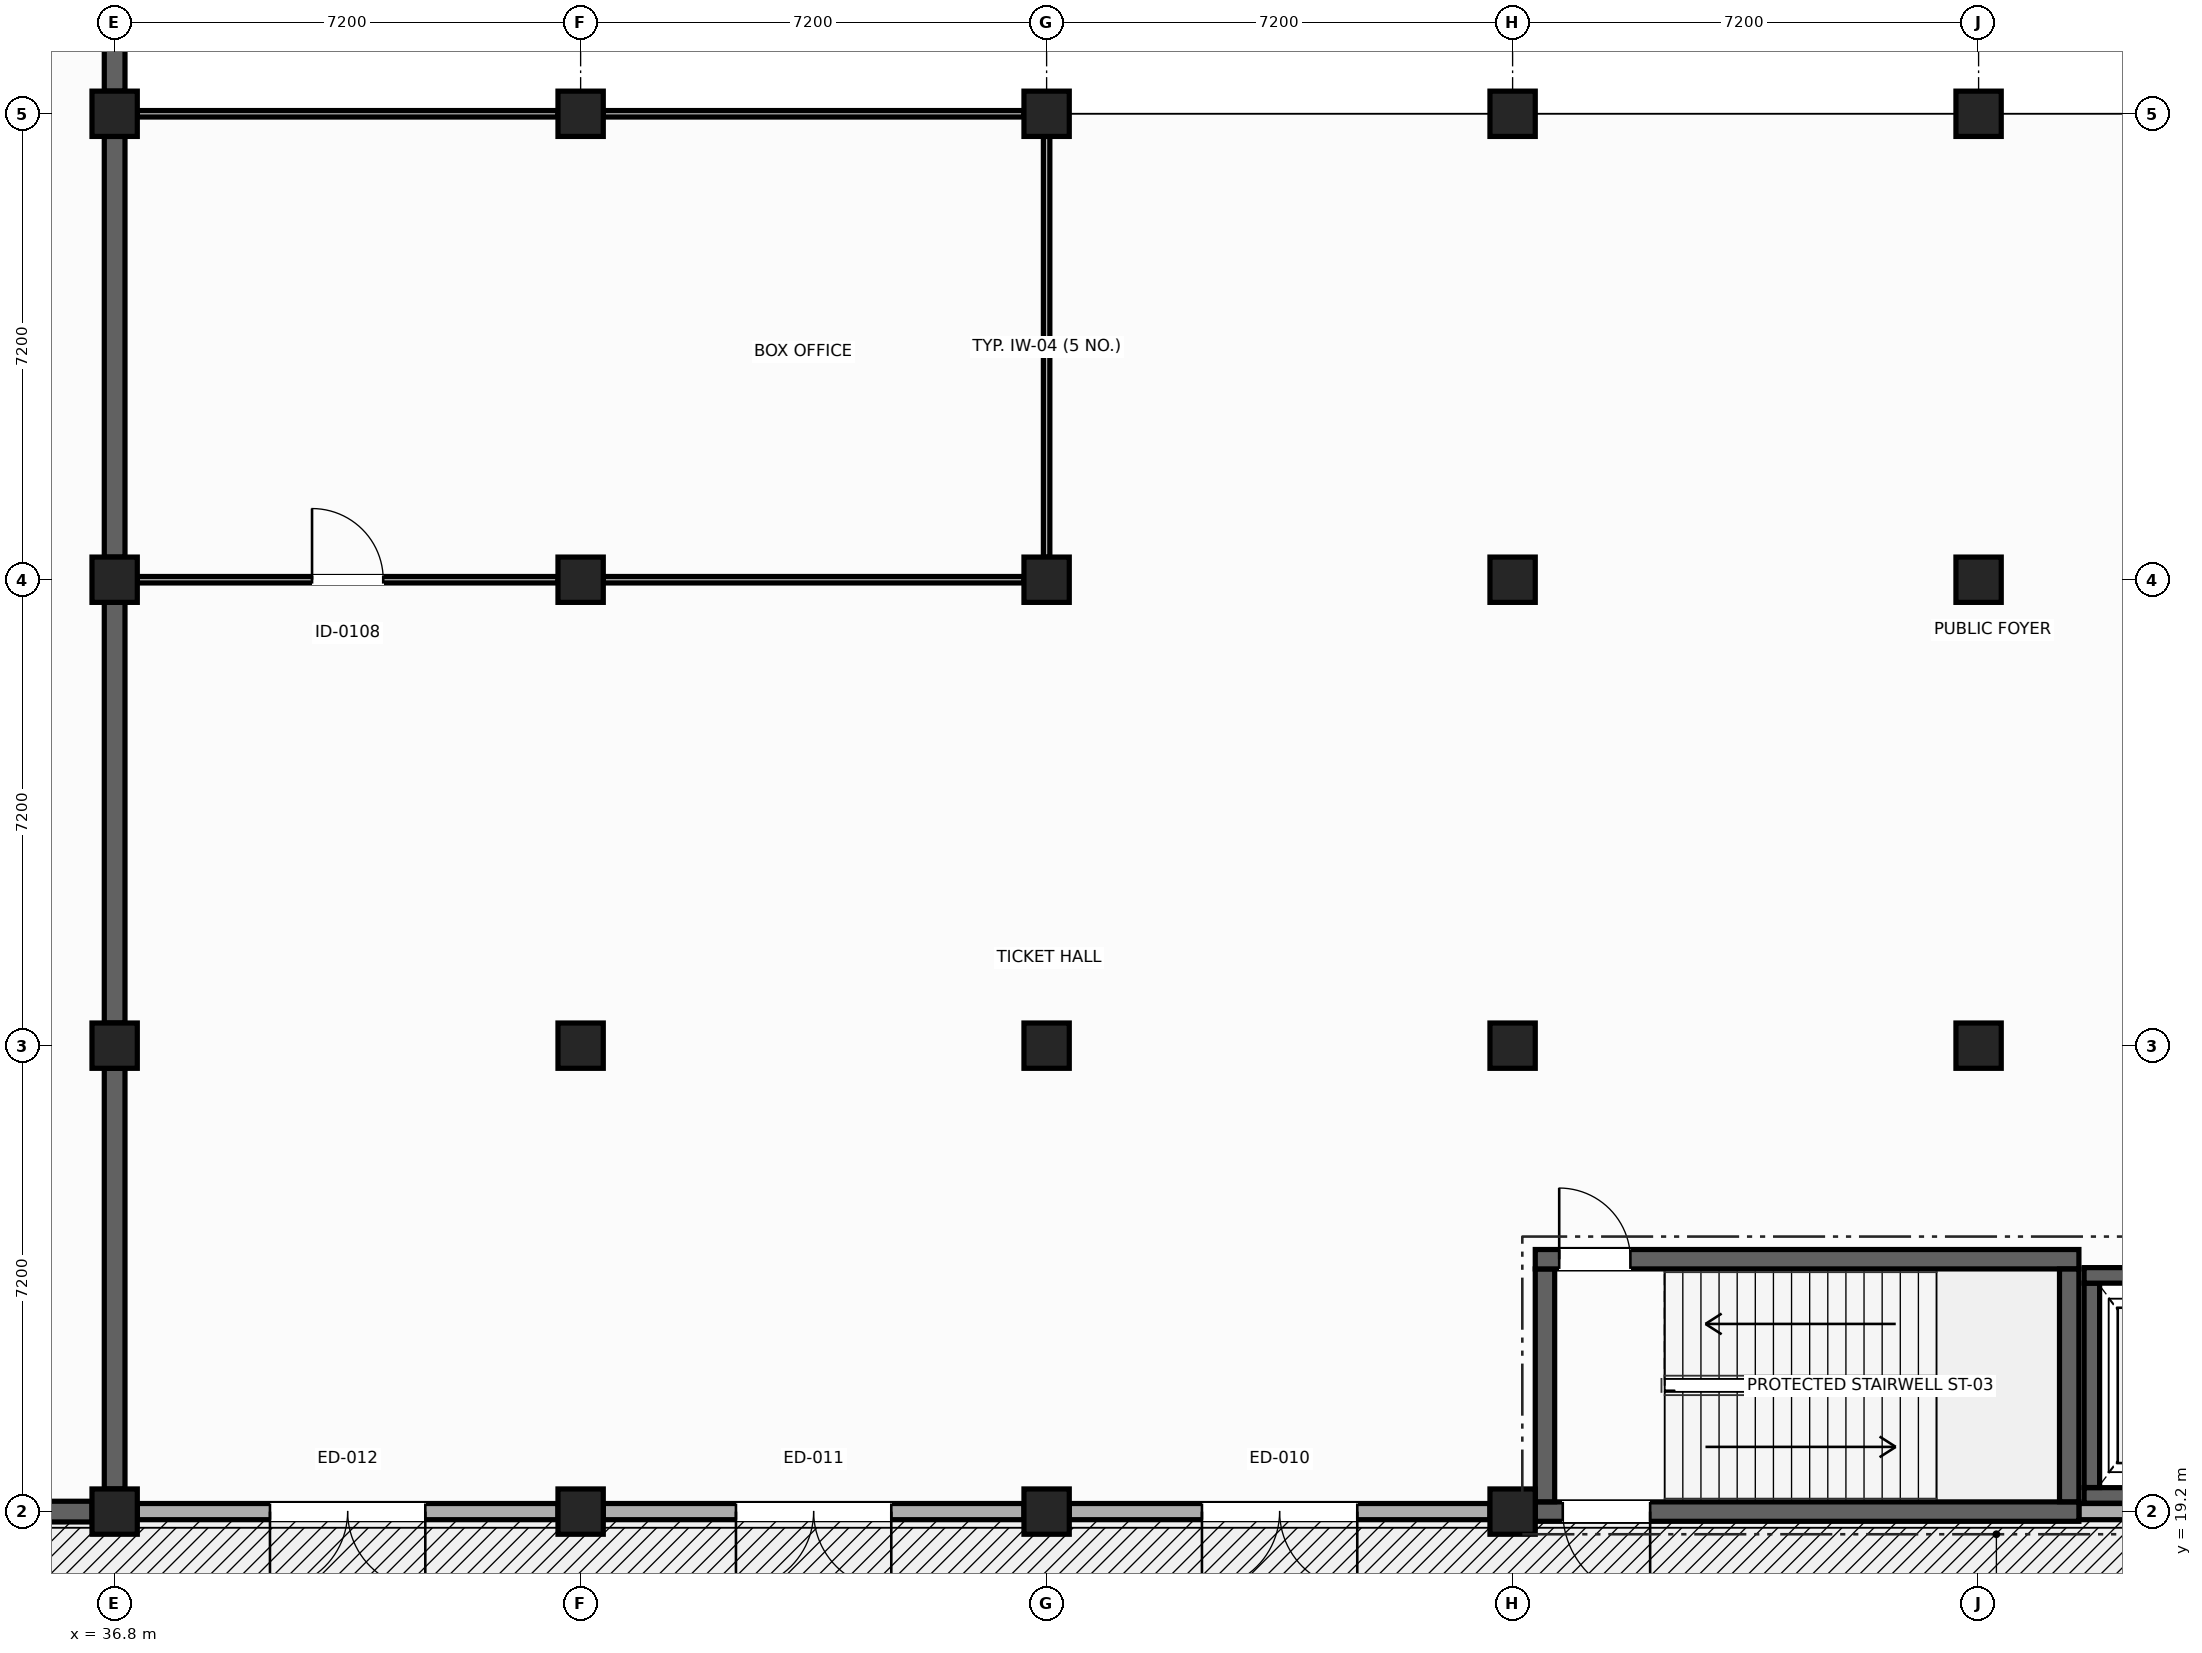
"""IFC4 building model, lengths in metres.
Left out: names, types, materials, properties, quantities, classifications, styles, units other than length and angle.
Written with IfcOpenShell. Run it as: python <this file> out.ifc"""

import sys

from ifc_helpers import new_model, si_unit, direction, frame, frame_2d, origin, origin_2d, place, context, subcontext, project, spatial, rectangle, extrude, element, fill, save


model = new_model("IFC4")
c1 = context("Model", 3, precision=1e-05, world=origin(), true_north=direction((0.0, 1.0)))
c2 = subcontext(c1, "Body", "Model", "MODEL_VIEW")
j1 = project(units=[si_unit("LENGTHUNIT", "METRE"), si_unit("PLANEANGLEUNIT", "RADIAN")], contexts=[c1])
p1 = place(None, origin())
s1 = spatial("IfcSite", under=j1, at=p1, CompositionType="ELEMENT")
p2 = place(p1, origin())
s2 = spatial("IfcBuilding", under=s1, at=p2, CompositionType="ELEMENT")
p3 = place(p2, origin())
s3 = spatial("IfcBuildingStorey", under=s2, at=p3, CompositionType="ELEMENT", Elevation=0.0)
for number, where, z_axis, x_axis in (
    (1, (36.8, 19.2, 0.0), (0.0, 0.0, 1.0), (1.0, 0.0, 0.0)),
    (2, (44.0, 19.2, 0.0), (0.0, 0.0, 1.0), (0.0, 1.0, 0.0)),
    (3, (51.2, 19.2, 0.0), (0.0, 0.0, 1.0), (1.0, 0.0, 0.0)),
    (4, (58.4, 19.2, 0.0), (0.0, 0.0, 1.0), (0.0, 1.0, 0.0)),
    (5, (36.8, 26.4, 0.0), (0.0, 0.0, 1.0), (0.0, 1.0, 0.0)),
    (6, (44.0, 26.4, 0.0), (0.0, 0.0, 1.0), (1.0, 0.0, 0.0)),
    (7, (51.2, 26.4, 0.0), (0.0, 0.0, 1.0), (0.0, 1.0, 0.0)),
    (8, (58.4, 26.4, 0.0), (0.0, 0.0, 1.0), (1.0, 0.0, 0.0)),
    (9, (65.6, 26.4, 0.0), (0.0, 0.0, 1.0), (1.0, 0.0, 0.0)),
    (10, (36.8, 33.6, 0.0), (0.0, 0.0, 1.0), (1.0, 0.0, 0.0)),
    (11, (44.0, 33.6, 0.0), (0.0, 0.0, 1.0), (0.0, 1.0, 0.0)),
    (12, (51.2, 33.6, 0.0), (0.0, 0.0, 1.0), (1.0, 0.0, 0.0)),
    (13, (58.4, 33.6, 0.0), (0.0, 0.0, 1.0), (1.0, 0.0, 0.0)),
    (14, (65.6, 33.6, 0.0), (0.0, 0.0, 1.0), (0.0, 1.0, 0.0)),
    (15, (36.8, 40.8, 0.0), (0.0, 0.0, 1.0), (0.0, 1.0, 0.0)),
    (16, (44.0, 40.8, 0.0), (0.0, 0.0, 1.0), (1.0, 0.0, 0.0)),
    (17, (51.2, 40.8, 0.0), (0.0, 0.0, 1.0), (1.0, 0.0, 0.0)),
    (18, (58.4, 40.8, 0.0), (0.0, 0.0, 1.0), (0.0, 1.0, 0.0)),
    (19, (65.6, 40.8, 0.0), (0.0, 0.0, 1.0), (1.0, 0.0, 0.0)),
):
    element("IfcColumn", number, at=place(p3, frame(where, z_axis=z_axis, x_axis=x_axis)), inside=s3, PredefinedType="COLUMN", context=c2, shape_type="SweptSolid", body=[
        extrude(rectangle(XDim=0.7, YDim=0.7, at=origin_2d()), origin(), (0.0, 0.0, 1.0), 5.4),
    ])
p4 = place(p3, frame((36.45, 19.2, 0.0), z_axis=(0.0, 0.0, 1.0), x_axis=(-1.0, 0.0, 0.0)))
e20 = element("IfcWall", 20, at=p4, inside=s3, PredefinedType="SOLIDWALL", context=c2, shape_type="SweptSolid", body=[
    extrude(rectangle(XDim=6.5, YDim=0.32, at=frame_2d((3.25, 0.0))), origin(), (0.0, 0.0, 1.0), 5.12),
])
p5 = place(p4, frame((2.25, 0.0, 0.0)))
e21 = element("IfcOpeningElement", 21, at=p5, cuts=e20, PredefinedType="OPENING", context=c2, shape_type="SweptSolid", body=[
    extrude(rectangle(XDim=2.0, YDim=2.4, at=frame_2d((1.0, 1.2))), frame((0.0, 0.17, 0.0), z_axis=(0.0, -1.0, 0.0), x_axis=(1.0, 0.0, 0.0)), (0.0, 0.0, 1.0), 0.34),
])
p6 = place(p3, frame((36.8, 47.65, 0.0), z_axis=(0.0, 0.0, 1.0), x_axis=(0.0, -1.0, 0.0)))
e22 = element("IfcWall", 22, at=p6, inside=s3, PredefinedType="SOLIDWALL", context=c2, shape_type="SweptSolid", body=[
    extrude(rectangle(XDim=6.5, YDim=0.32, at=frame_2d((3.25, 0.0))), origin(), (0.0, 0.0, 1.0), 5.12),
])
p7 = place(p6, frame((1.0, 0.0, 0.9)))
e23 = element("IfcOpeningElement", 23, at=p7, cuts=e22, PredefinedType="OPENING", context=c2, shape_type="SweptSolid", body=[
    extrude(rectangle(XDim=2.2, YDim=1.8, at=frame_2d((1.1, 0.9))), frame((0.0, 0.17, 0.0), z_axis=(0.0, -1.0, 0.0), x_axis=(1.0, 0.0, 0.0)), (0.0, 0.0, 1.0), 0.34),
])
for number, where, z_axis, x_axis in (
    (24, (36.8, 40.45, 0.0), (0.0, 0.0, 1.0), (0.0, -1.0, 0.0)),
    (25, (36.8, 33.25, 0.0), (0.0, 0.0, 1.0), (0.0, -1.0, 0.0)),
    (26, (36.8, 26.05, 0.0), (0.0, 0.0, 1.0), (0.0, -1.0, 0.0)),
):
    element("IfcWall", number, at=place(p3, frame(where, z_axis=z_axis, x_axis=x_axis)), inside=s3, PredefinedType="SOLIDWALL", context=c2, shape_type="SweptSolid", body=[
        extrude(rectangle(XDim=6.5, YDim=0.32, at=frame_2d((3.25, 0.0))), origin(), (0.0, 0.0, 1.0), 5.1),
    ])
p8 = place(p3, frame((72.45, 19.2, 0.0), z_axis=(0.0, 0.0, 1.0), x_axis=(-1.0, 0.0, 0.0)))
e27 = element("IfcWall", 27, at=p8, inside=s3, PredefinedType="SOLIDWALL", context=c2, shape_type="SweptSolid", body=[
    extrude(rectangle(XDim=5.3, YDim=0.25, at=frame_2d((2.65, 0.0))), origin(), (0.0, 0.0, 1.0), 4.645),
])
p9 = place(p3, frame((58.05, 19.2, 0.0), z_axis=(0.0, 0.0, 1.0), x_axis=(-1.0, 0.0, 0.0)))
e28 = element("IfcWall", 28, at=p9, inside=s3, PredefinedType="SOLIDWALL", context=c2, shape_type="SweptSolid", body=[
    extrude(rectangle(XDim=6.5, YDim=0.25, at=frame_2d((3.25, 0.0))), origin(), (0.0, 0.0, 1.0), 4.395),
])
p10 = place(p9, frame((2.05, 0.0, 0.0)))
e29 = element("IfcOpeningElement", 29, at=p10, cuts=e28, PredefinedType="OPENING", context=c2, shape_type="SweptSolid", body=[
    extrude(rectangle(XDim=2.4, YDim=2.7, at=frame_2d((1.2, 1.35))), frame((0.0, 0.135, 0.0), z_axis=(0.0, -1.0, 0.0), x_axis=(1.0, 0.0, 0.0)), (0.0, 0.0, 1.0), 0.27),
])
p11 = place(p3, frame((50.85, 19.2, 0.0), z_axis=(0.0, 0.0, 1.0), x_axis=(-1.0, 0.0, 0.0)))
e30 = element("IfcWall", 30, at=p11, inside=s3, PredefinedType="SOLIDWALL", context=c2, shape_type="SweptSolid", body=[
    extrude(rectangle(XDim=6.5, YDim=0.25, at=frame_2d((3.25, 0.0))), origin(), (0.0, 0.0, 1.0), 4.395),
])
p12 = place(p11, frame((2.05, 0.0, 0.0)))
e31 = element("IfcOpeningElement", 31, at=p12, cuts=e30, PredefinedType="OPENING", context=c2, shape_type="SweptSolid", body=[
    extrude(rectangle(XDim=2.4, YDim=2.7, at=frame_2d((1.2, 1.35))), frame((0.0, 0.135, 0.0), z_axis=(0.0, -1.0, 0.0), x_axis=(1.0, 0.0, 0.0)), (0.0, 0.0, 1.0), 0.27),
])
p13 = place(p3, frame((43.65, 19.2, 0.0), z_axis=(0.0, 0.0, 1.0), x_axis=(-1.0, 0.0, 0.0)))
e32 = element("IfcWall", 32, at=p13, inside=s3, PredefinedType="SOLIDWALL", context=c2, shape_type="SweptSolid", body=[
    extrude(rectangle(XDim=6.5, YDim=0.25, at=frame_2d((3.25, 0.0))), origin(), (0.0, 0.0, 1.0), 4.395),
])
p14 = place(p13, frame((2.05, 0.0, 0.0)))
e33 = element("IfcOpeningElement", 33, at=p14, cuts=e32, PredefinedType="OPENING", context=c2, shape_type="SweptSolid", body=[
    extrude(rectangle(XDim=2.4, YDim=2.7, at=frame_2d((1.2, 1.35))), frame((0.0, 0.135, 0.0), z_axis=(0.0, -1.0, 0.0), x_axis=(1.0, 0.0, 0.0)), (0.0, 0.0, 1.0), 0.27),
])
p15 = place(p3, frame((67.15, 19.2, 0.0), z_axis=(0.0, 0.0, 1.0), x_axis=(-1.0, 0.0, 0.0)))
e34 = element("IfcWall", 34, at=p15, inside=s3, PredefinedType="SHEAR", context=c2, shape_type="SweptSolid", body=[
    extrude(rectangle(XDim=8.4, YDim=0.3, at=frame_2d((4.2, 0.0))), origin(), (0.0, 0.0, 1.0), 5.1),
])
p16 = place(p15, frame((6.625, 0.0, 0.0)))
e35 = element("IfcOpeningElement", 35, at=p16, cuts=e34, PredefinedType="OPENING", context=c2, shape_type="SweptSolid", body=[
    extrude(rectangle(XDim=1.35, YDim=2.2, at=frame_2d((0.675, 1.1))), frame((0.0, 0.16, 0.0), z_axis=(0.0, -1.0, 0.0), x_axis=(1.0, 0.0, 0.0)), (0.0, 0.0, 1.0), 0.32),
])
p17 = place(p3, frame((58.9, 19.352, 0.0), z_axis=(0.0, 0.0, 1.0), x_axis=(0.0, 1.0, 0.0)))
e36 = element("IfcWall", 36, at=p17, inside=s3, PredefinedType="SHEAR", context=c2, shape_type="SweptSolid", body=[
    extrude(rectangle(XDim=3.598, YDim=0.3, at=frame_2d((1.799, 0.0))), origin(), (0.0, 0.0, 1.0), 5.1),
])
p18 = place(p3, frame((58.75, 23.1, 0.0), z_axis=(0.0, 0.0, 1.0), x_axis=(1.0, 0.0, 0.0)))
e37 = element("IfcWall", 37, at=p18, inside=s3, PredefinedType="SHEAR", context=c2, shape_type="SweptSolid", body=[
    extrude(rectangle(XDim=8.4, YDim=0.3, at=frame_2d((4.2, 0.0))), origin(), (0.0, 0.0, 1.0), 5.1),
])
p19 = place(p18, frame((0.37, 0.0, 0.0)))
e38 = element("IfcOpeningElement", 38, at=p19, cuts=e37, PredefinedType="OPENING", context=c2, shape_type="SweptSolid", body=[
    extrude(rectangle(XDim=1.1, YDim=2.15, at=frame_2d((0.55, 1.075))), frame((0.0, 0.16, 0.0), z_axis=(0.0, -1.0, 0.0), x_axis=(1.0, 0.0, 0.0)), (0.0, 0.0, 1.0), 0.32),
])
p20 = place(p3, frame((67.0, 22.948, 0.0), z_axis=(0.0, 0.0, 1.0), x_axis=(0.0, -1.0, 0.0)))
e39 = element("IfcWall", 39, at=p20, inside=s3, PredefinedType="SHEAR", context=c2, shape_type="SweptSolid", body=[
    extrude(rectangle(XDim=3.596, YDim=0.3, at=frame_2d((1.798, 0.0))), origin(), (0.0, 0.0, 1.0), 5.1),
])
p21 = place(p3, frame((70.07, 19.45, 0.0), z_axis=(0.0, 0.0, 1.0), x_axis=(-1.0, 0.0, 0.0)))
e40 = element("IfcWall", 40, at=p21, inside=s3, PredefinedType="SHEAR", context=c2, shape_type="SweptSolid", body=[
    extrude(rectangle(XDim=2.84, YDim=0.24, at=frame_2d((1.42, 0.0))), origin(), (0.0, 0.0, 1.0), 5.1),
])
p22 = place(p3, frame((67.35, 19.572, 0.0), z_axis=(0.0, 0.0, 1.0), x_axis=(0.0, 1.0, 0.0)))
e41 = element("IfcWall", 41, at=p22, inside=s3, PredefinedType="SHEAR", context=c2, shape_type="SweptSolid", body=[
    extrude(rectangle(XDim=3.158, YDim=0.24, at=frame_2d((1.579, 0.0))), origin(), (0.0, 0.0, 1.0), 5.1),
])
p23 = place(p3, frame((67.23, 22.85, 0.0), z_axis=(0.0, 0.0, 1.0), x_axis=(1.0, 0.0, 0.0)))
e42 = element("IfcWall", 42, at=p23, inside=s3, PredefinedType="SHEAR", context=c2, shape_type="SweptSolid", body=[
    extrude(rectangle(XDim=2.84, YDim=0.24, at=frame_2d((1.42, 0.0))), origin(), (0.0, 0.0, 1.0), 5.1),
])
p24 = place(p23, frame((0.82, 0.0, 0.0)))
e43 = element("IfcOpeningElement", 43, at=p24, cuts=e42, PredefinedType="OPENING", context=c2, shape_type="SweptSolid", body=[
    extrude(rectangle(XDim=1.2, YDim=2.15, at=frame_2d((0.6, 1.075))), frame((0.0, 0.13, 0.0), z_axis=(0.0, -1.0, 0.0), x_axis=(1.0, 0.0, 0.0)), (0.0, 0.0, 1.0), 0.26),
])
for number, where, z_axis, x_axis in (
    (44, (51.2, 33.95, 0.0), (0.0, 0.0, 1.0), (0.0, 1.0, 0.0)),
    (45, (50.85, 40.8, 0.0), (0.0, 0.0, 1.0), (-1.0, 0.0, 0.0)),
    (46, (43.65, 40.8, 0.0), (0.0, 0.0, 1.0), (-1.0, 0.0, 0.0)),
):
    element("IfcWall", number, at=place(p3, frame(where, z_axis=z_axis, x_axis=x_axis)), inside=s3, PredefinedType="PARTITIONING", context=c2, shape_type="SweptSolid", body=[
        extrude(rectangle(XDim=6.5, YDim=0.1, at=frame_2d((3.25, 0.0))), origin(), (0.0, 0.0, 1.0), 4.295),
    ])
p25 = place(p3, frame((37.15, 33.6, 0.0), z_axis=(0.0, 0.0, 1.0), x_axis=(1.0, 0.0, 0.0)))
e47 = element("IfcWall", 47, at=p25, inside=s3, PredefinedType="PARTITIONING", context=c2, shape_type="SweptSolid", body=[
    extrude(rectangle(XDim=6.5, YDim=0.1, at=frame_2d((3.25, 0.0))), origin(), (0.0, 0.0, 1.0), 4.295),
])
p26 = place(p25, frame((2.7, 0.0, 0.0)))
e48 = element("IfcOpeningElement", 48, at=p26, cuts=e47, PredefinedType="OPENING", context=c2, shape_type="SweptSolid", body=[
    extrude(rectangle(XDim=1.1, YDim=2.15, at=frame_2d((0.55, 1.075))), frame((0.0, 0.06, 0.0), z_axis=(0.0, -1.0, 0.0), x_axis=(1.0, 0.0, 0.0)), (0.0, 0.0, 1.0), 0.12),
])
p27 = place(p3, frame((44.35, 33.6, 0.0), z_axis=(0.0, 0.0, 1.0), x_axis=(1.0, 0.0, 0.0)))
e49 = element("IfcWall", 49, at=p27, inside=s3, PredefinedType="PARTITIONING", context=c2, shape_type="SweptSolid", body=[
    extrude(rectangle(XDim=6.5, YDim=0.1, at=frame_2d((3.25, 0.0))), origin(), (0.0, 0.0, 1.0), 4.295),
])
p28 = place(p10, origin())
e50 = element("IfcDoor", 50, at=p28, inside=s3, OperationType="DOUBLE_DOOR_SINGLE_SWING", PredefinedType="DOOR", context=c2, shape_type="SweptSolid", body=[
    extrude(rectangle(XDim=2.4, YDim=2.7, at=frame_2d((1.2, 1.35))), frame((0.0, 0.025, 0.0), z_axis=(0.0, -1.0, 0.0), x_axis=(1.0, 0.0, 0.0)), (0.0, 0.0, 1.0), 0.05),
])
fill(e29, e50)
p29 = place(p12, origin())
e51 = element("IfcDoor", 51, at=p29, inside=s3, OperationType="DOUBLE_DOOR_SINGLE_SWING", PredefinedType="DOOR", context=c2, shape_type="SweptSolid", body=[
    extrude(rectangle(XDim=2.4, YDim=2.7, at=frame_2d((1.2, 1.35))), frame((0.0, 0.025, 0.0), z_axis=(0.0, -1.0, 0.0), x_axis=(1.0, 0.0, 0.0)), (0.0, 0.0, 1.0), 0.05),
])
fill(e31, e51)
p30 = place(p14, origin())
e52 = element("IfcDoor", 52, at=p30, inside=s3, OperationType="DOUBLE_DOOR_SINGLE_SWING", PredefinedType="DOOR", context=c2, shape_type="SweptSolid", body=[
    extrude(rectangle(XDim=2.4, YDim=2.7, at=frame_2d((1.2, 1.35))), frame((0.0, 0.025, 0.0), z_axis=(0.0, -1.0, 0.0), x_axis=(1.0, 0.0, 0.0)), (0.0, 0.0, 1.0), 0.05),
])
fill(e33, e52)
p31 = place(p16, origin())
e53 = element("IfcDoor", 53, at=p31, inside=s3, OperationType="SINGLE_SWING_LEFT", PredefinedType="DOOR", context=c2, shape_type="SweptSolid", body=[
    extrude(rectangle(XDim=1.35, YDim=2.2, at=frame_2d((0.675, 1.1))), frame((0.0, 0.025, 0.0), z_axis=(0.0, -1.0, 0.0), x_axis=(1.0, 0.0, 0.0)), (0.0, 0.0, 1.0), 0.05),
])
fill(e35, e53)
p32 = place(p19, origin())
e54 = element("IfcDoor", 54, at=p32, inside=s3, OperationType="SINGLE_SWING_LEFT", PredefinedType="DOOR", context=c2, shape_type="SweptSolid", body=[
    extrude(rectangle(XDim=1.1, YDim=2.15, at=frame_2d((0.55, 1.075))), frame((0.0, 0.025, 0.0), z_axis=(0.0, -1.0, 0.0), x_axis=(1.0, 0.0, 0.0)), (0.0, 0.0, 1.0), 0.05),
])
fill(e38, e54)
p33 = place(p26, origin())
e55 = element("IfcDoor", 55, at=p33, inside=s3, OperationType="SINGLE_SWING_LEFT", PredefinedType="DOOR", context=c2, shape_type="SweptSolid", body=[
    extrude(rectangle(XDim=1.1, YDim=2.15, at=frame_2d((0.55, 1.075))), frame((0.0, 0.025, 0.0), z_axis=(0.0, -1.0, 0.0), x_axis=(1.0, 0.0, 0.0)), (0.0, 0.0, 1.0), 0.05),
])
fill(e48, e55)
save(model, sys.argv[1])
